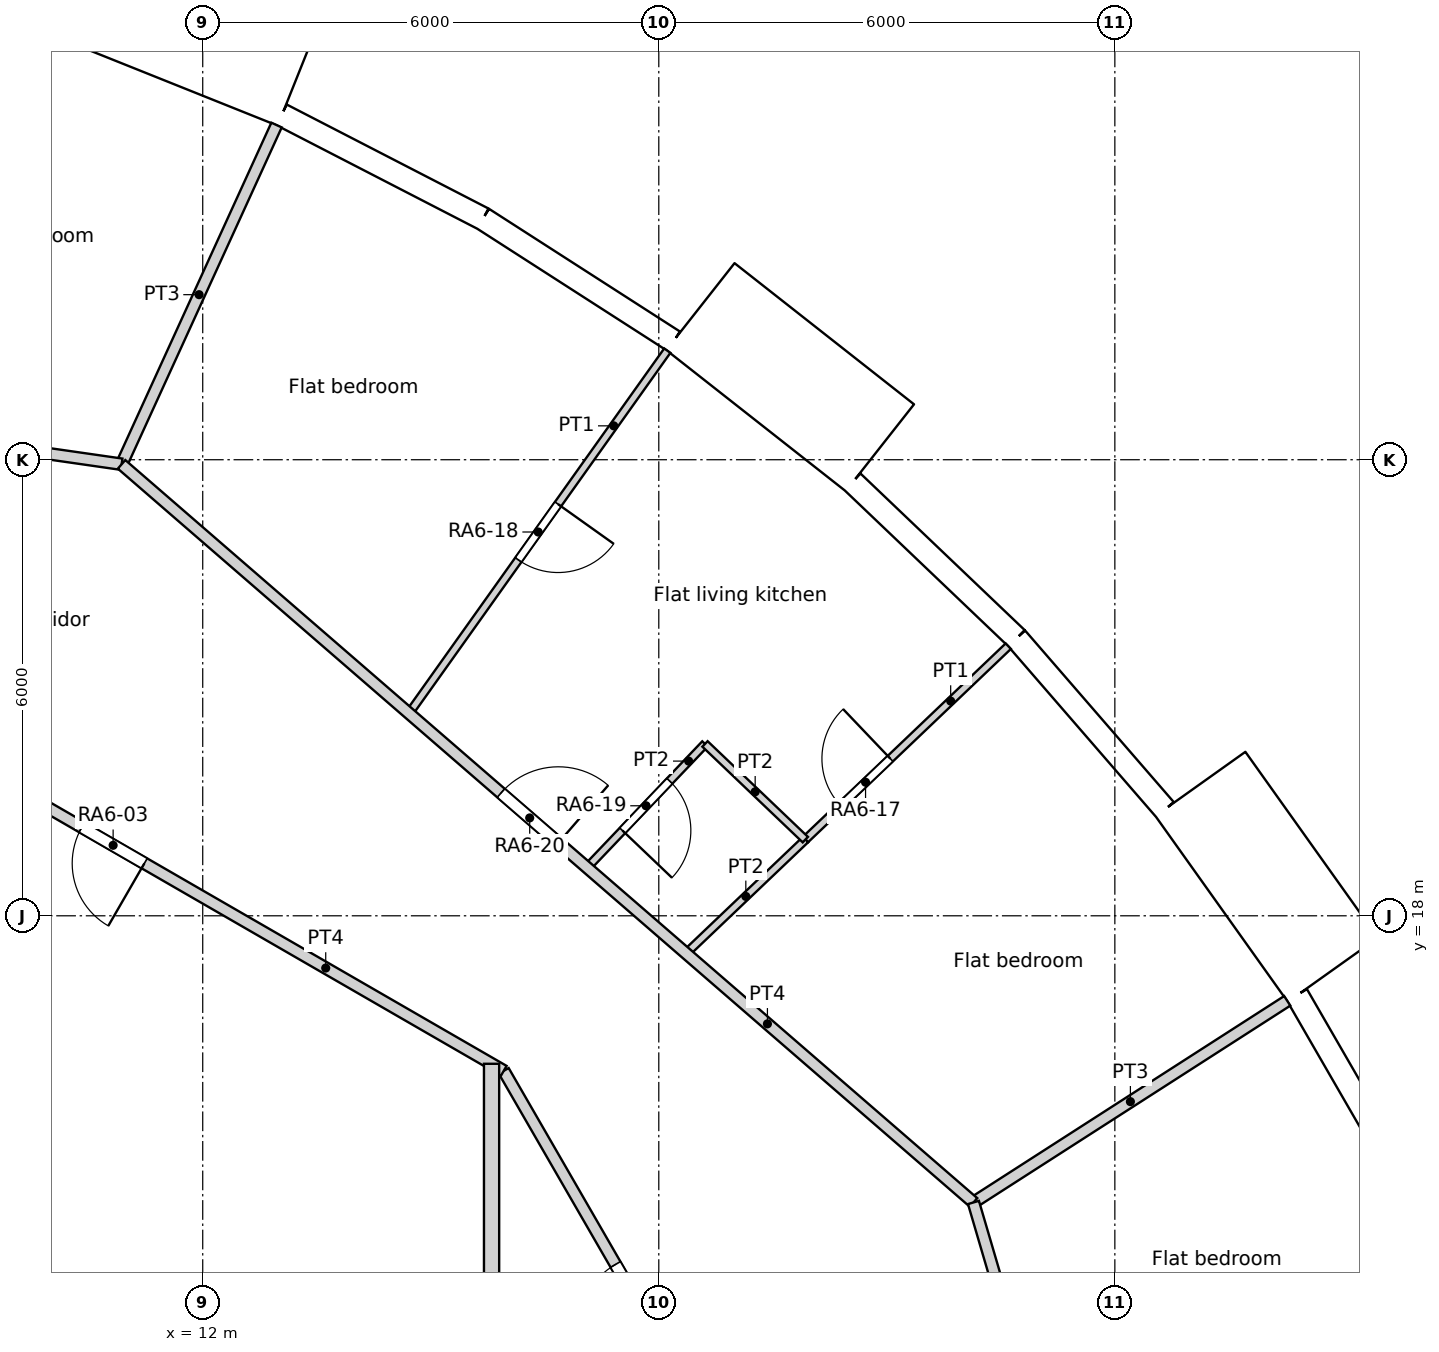
"""IFC4 building model, lengths in metres.
Left out: names, types, materials, properties, quantities, classifications, styles, units other than length and angle.
Written with IfcOpenShell. Run it as: python <this file> out.ifc"""

import sys

from ifc_helpers import new_model, si_unit, direction, frame, frame_2d, origin, origin_2d, place, context, subcontext, project, spatial, rectangle, circle, extrude, element, fill, save


model = new_model("IFC4")
c1 = context("Model", 3, precision=1e-05, world=origin(), true_north=direction((0.0, 1.0)))
c2 = subcontext(c1, "Body", "Model", "MODEL_VIEW")
j1 = project(units=[si_unit("LENGTHUNIT", "METRE"), si_unit("PLANEANGLEUNIT", "RADIAN")], contexts=[c1])
p1 = place(None, origin())
s1 = spatial("IfcSite", under=j1, at=p1, CompositionType="ELEMENT")
p2 = place(p1, origin())
s2 = spatial("IfcBuilding", under=s1, at=p2, CompositionType="ELEMENT")
p3 = place(p2, frame((0.0, 0.0, 82.2)))
s3 = spatial("IfcBuildingStorey", under=s2, at=p3, CompositionType="ELEMENT", Elevation=82.2)
for number, where, z_axis, x_axis in (
    (1, (25.469, 16.368, 0.0), (0.0, 0.0, 1.0), (1.0, 0.0, 0.0)),
    (2, (21.911, 20.892, 0.0), (0.0, 0.0, 1.0), (1.0, 0.0, 0.0)),
    (3, (17.561, 24.661, 0.0), (0.0, 0.0, 1.0), (1.0, 0.0, 0.0)),
    (4, (12.576, 27.539, 0.0), (0.0, 0.0, 1.0), (1.0, 0.0, 0.0)),
):
    element("IfcColumn", number, at=place(p3, frame(where, z_axis=z_axis, x_axis=x_axis)), inside=s3, PredefinedType="COLUMN", context=c2, shape_type="SweptSolid", body=[
        extrude(circle(Radius=0.6, at=origin_2d()), origin(), (0.0, 0.0, 1.0), 3.6),
    ])
for number, where, z_axis, x_axis in (
    (5, (18.805, 15.779, 0.0), (0.0, 0.0, 1.0), (1.0, 0.0, 0.0)),
    (6, (14.659, 19.69, 0.0), (0.0, 0.0, 1.0), (1.0, 0.0, 0.0)),
    (7, (9.723, 22.54, 0.0), (0.0, 0.0, 1.0), (1.0, 0.0, 0.0)),
):
    element("IfcColumn", number, at=place(p3, frame(where, z_axis=z_axis, x_axis=x_axis)), inside=s3, PredefinedType="COLUMN", context=c2, shape_type="SweptSolid", body=[
        extrude(circle(Radius=0.65, at=origin_2d()), origin(), (0.0, 0.0, 1.0), 3.6),
    ])
p4 = place(p3, frame((11.735, 14.716, 0.0), z_axis=(0.0, 0.0, 1.0), x_axis=(1.0, 0.0, 0.0)))
e8 = element("IfcColumn", 8, at=p4, inside=s3, PredefinedType="COLUMN", context=c2, shape_type="SweptSolid", body=[
    extrude(circle(Radius=0.7, at=origin_2d()), origin(), (0.0, 0.0, 1.0), 3.6),
])
p5 = place(p3, frame((27.887, 14.377, 0.0), z_axis=(0.0, 0.0, 1.0), x_axis=(-0.499999078476, 0.866025935826, 0.0)))
e9 = element("IfcWall", 9, at=p5, inside=s3, PredefinedType="SOLIDWALL", context=c2, shape_type="SweptSolid", body=[
    extrude(rectangle(XDim=2.979, YDim=0.3, at=frame_2d((1.49, 0.0))), origin(), (0.0, 0.0, 1.0), 3.15),
])
p6 = place(p5, frame((1.49, 0.0, 1.55)))
e10 = element("IfcOpeningElement", 10, at=p6, cuts=e9, PredefinedType="OPENING", context=c2, shape_type="SweptSolid", body=[
    extrude(circle(Radius=0.9, at=origin_2d()), frame((0.0, 0.16, 0.0), z_axis=(0.0, -1.0, 0.0), x_axis=(1.0, 0.0, 0.0)), (0.0, 0.0, 1.0), 0.32),
])
p7 = place(p3, frame((26.866, 17.29, -0.45), z_axis=(0.0, 0.0, 1.0), x_axis=(-0.580090570606, 0.814551981088, 0.0)))
e11 = element("IfcWall", 11, at=p7, inside=s3, PredefinedType="ELEMENTEDWALL", context=c2, shape_type="SweptSolid", body=[
    extrude(rectangle(XDim=3.0, YDim=1.45, at=frame_2d((1.5, 0.0))), origin(), (0.0, 0.0, 1.0), 3.6),
])
p8 = place(p7, frame((1.5, 0.0, 2.0)))
e12 = element("IfcOpeningElement", 12, at=p8, cuts=e11, PredefinedType="OPENING", context=c2, shape_type="SweptSolid", body=[
    extrude(circle(Radius=0.9, at=origin_2d()), frame((0.0, 0.735, 0.0), z_axis=(0.0, -1.0, 0.0), x_axis=(1.0, 0.0, 0.0)), (0.0, 0.0, 1.0), 1.47),
])
p9 = place(p3, frame((24.658, 19.399, 0.0), z_axis=(0.0, 0.0, 1.0), x_axis=(-0.654830712471, 0.755775587066, 0.0)))
e13 = element("IfcWall", 13, at=p9, inside=s3, PredefinedType="SOLIDWALL", context=c2, shape_type="SweptSolid", body=[
    extrude(rectangle(XDim=2.98, YDim=0.3, at=frame_2d((1.49, 0.0))), origin(), (0.0, 0.0, 1.0), 3.15),
])
p10 = place(p9, frame((1.49, 0.0, 1.55)))
e14 = element("IfcOpeningElement", 14, at=p10, cuts=e13, PredefinedType="OPENING", context=c2, shape_type="SweptSolid", body=[
    extrude(circle(Radius=0.9, at=origin_2d()), frame((0.0, 0.16, 0.0), z_axis=(0.0, -1.0, 0.0), x_axis=(1.0, 0.0, 0.0)), (0.0, 0.0, 1.0), 0.32),
])
p11 = place(p3, frame((22.707, 21.651, 0.0), z_axis=(0.0, 0.0, 1.0), x_axis=(-0.723744206617, 0.690068346896, 0.0)))
e15 = element("IfcWall", 15, at=p11, inside=s3, PredefinedType="SOLIDWALL", context=c2, shape_type="SweptSolid", body=[
    extrude(rectangle(XDim=2.98, YDim=0.3, at=frame_2d((1.49, 0.0))), origin(), (0.0, 0.0, 1.0), 3.15),
])
p12 = place(p11, frame((1.49, 0.0, 1.55)))
e16 = element("IfcOpeningElement", 16, at=p12, cuts=e15, PredefinedType="OPENING", context=c2, shape_type="SweptSolid", body=[
    extrude(circle(Radius=0.9, at=origin_2d()), frame((0.0, 0.16, 0.0), z_axis=(0.0, -1.0, 0.0), x_axis=(1.0, 0.0, 0.0)), (0.0, 0.0, 1.0), 0.32),
])
p13 = place(p3, frame((20.907, 24.159, -0.45), z_axis=(0.0, 0.0, 1.0), x_axis=(-0.786049992888, 0.618162930529, 0.0)))
e17 = element("IfcWall", 17, at=p13, inside=s3, PredefinedType="ELEMENTEDWALL", context=c2, shape_type="SweptSolid", body=[
    extrude(rectangle(XDim=3.0, YDim=1.45, at=frame_2d((1.5, 0.0))), origin(), (0.0, 0.0, 1.0), 3.6),
])
p14 = place(p13, frame((1.5, 0.0, 2.0)))
e18 = element("IfcOpeningElement", 18, at=p14, cuts=e17, PredefinedType="OPENING", context=c2, shape_type="SweptSolid", body=[
    extrude(circle(Radius=0.9, at=origin_2d()), frame((0.0, 0.735, 0.0), z_axis=(0.0, -1.0, 0.0), x_axis=(1.0, 0.0, 0.0)), (0.0, 0.0, 1.0), 1.47),
])
p15 = place(p3, frame((18.194, 25.56, 0.0), z_axis=(0.0, 0.0, 1.0), x_axis=(-0.84122372879, 0.540687190639, 0.0)))
e19 = element("IfcWall", 19, at=p15, inside=s3, PredefinedType="SOLIDWALL", context=c2, shape_type="SweptSolid", body=[
    extrude(rectangle(XDim=2.98, YDim=0.3, at=frame_2d((1.49, 0.0))), origin(), (0.0, 0.0, 1.0), 3.15),
])
p16 = place(p15, frame((1.49, 0.0, 1.55)))
e20 = element("IfcOpeningElement", 20, at=p16, cuts=e19, PredefinedType="OPENING", context=c2, shape_type="SweptSolid", body=[
    extrude(circle(Radius=0.9, at=origin_2d()), frame((0.0, 0.16, 0.0), z_axis=(0.0, -1.0, 0.0), x_axis=(1.0, 0.0, 0.0)), (0.0, 0.0, 1.0), 0.32),
])
p17 = place(p3, frame((15.687, 27.171, 0.0), z_axis=(0.0, 0.0, 1.0), x_axis=(-0.888853225096, 0.4581920386, 0.0)))
e21 = element("IfcWall", 21, at=p17, inside=s3, PredefinedType="SOLIDWALL", context=c2, shape_type="SweptSolid", body=[
    extrude(rectangle(XDim=2.979, YDim=0.3, at=frame_2d((1.49, 0.0))), origin(), (0.0, 0.0, 1.0), 3.15),
])
p18 = place(p17, frame((1.49, 0.0, 1.55)))
e22 = element("IfcOpeningElement", 22, at=p18, cuts=e21, PredefinedType="OPENING", context=c2, shape_type="SweptSolid", body=[
    extrude(circle(Radius=0.9, at=origin_2d()), frame((0.0, 0.16, 0.0), z_axis=(0.0, -1.0, 0.0), x_axis=(1.0, 0.0, 0.0)), (0.0, 0.0, 1.0), 0.32),
])
p19 = place(p3, frame((13.254, 29.07, -0.45), z_axis=(0.0, 0.0, 1.0), x_axis=(-0.928358776184, 0.371685327504, 0.0)))
e23 = element("IfcWall", 23, at=p19, inside=s3, PredefinedType="ELEMENTEDWALL", context=c2, shape_type="SweptSolid", body=[
    extrude(rectangle(XDim=3.0, YDim=1.45, at=frame_2d((1.5, 0.0))), origin(), (0.0, 0.0, 1.0), 3.6),
])
p20 = place(p19, frame((1.5, 0.0, 2.0)))
e24 = element("IfcOpeningElement", 24, at=p20, cuts=e23, PredefinedType="OPENING", context=c2, shape_type="SweptSolid", body=[
    extrude(circle(Radius=0.9, at=origin_2d()), frame((0.0, 0.735, 0.0), z_axis=(0.0, -1.0, 0.0), x_axis=(1.0, 0.0, 0.0)), (0.0, 0.0, 1.0), 1.47),
])
p21 = place(p3, frame((15.96, 15.96, 0.0), z_axis=(0.0, 0.0, 1.0), x_axis=(0.499992689227, -0.86602962462, 0.0)))
e25 = element("IfcWall", 25, at=p21, inside=s3, PredefinedType="PARTITIONING", context=c2, shape_type="SweptSolid", body=[
    extrude(rectangle(XDim=6.882, YDim=0.15, at=frame_2d((3.441, 0.0))), origin(), (0.0, 0.0, 1.0), 3.15),
])
p22 = place(p21, frame((2.941, 0.0, 0.0)))
e26 = element("IfcOpeningElement", 26, at=p22, cuts=e25, PredefinedType="OPENING", context=c2, shape_type="SweptSolid", body=[
    extrude(rectangle(XDim=1.0, YDim=2.04, at=frame_2d((0.5, 1.02))), frame((0.0, 0.075, 0.0), z_axis=(0.0, -1.0, 0.0), x_axis=(1.0, 0.0, 0.0)), (0.0, 0.0, 1.0), 0.15),
])
p23 = place(p3, frame((22.14, 14.229, 0.0), z_axis=(0.0, 0.0, 1.0), x_axis=(0.281845438276, -0.959459821422, 0.0)))
e27 = element("IfcWall", 27, at=p23, inside=s3, PredefinedType="PARTITIONING", context=c2, shape_type="SweptSolid", body=[
    extrude(rectangle(XDim=14.83, YDim=0.15, at=frame_2d((7.415, 0.0))), origin(), (0.0, 0.0, 1.0), 3.15),
])
p24 = place(p23, frame((6.053, 0.0, 0.0)))
e28 = element("IfcOpeningElement", 28, at=p24, cuts=e27, PredefinedType="OPENING", context=c2, shape_type="SweptSolid", body=[
    extrude(rectangle(XDim=1.0, YDim=2.1, at=frame_2d((0.5, 1.05))), frame((0.0, 0.075, 0.0), z_axis=(0.0, -1.0, 0.0), x_axis=(1.0, 0.0, 0.0)), (0.0, 0.0, 1.0), 0.15),
])
p25 = place(p3, frame((10.932, 23.939, 0.0), z_axis=(0.0, 0.0, 1.0), x_axis=(0.755823777664, -0.654775088956, 0.0)))
e29 = element("IfcWall", 29, at=p25, inside=s3, PredefinedType="PARTITIONING", context=c2, shape_type="SweptSolid", body=[
    extrude(rectangle(XDim=14.83, YDim=0.15, at=frame_2d((7.415, 0.0))), origin(), (0.0, 0.0, 1.0), 3.15),
])
p26 = place(p25, frame((6.604, 0.0, 0.0)))
e30 = element("IfcOpeningElement", 30, at=p26, cuts=e29, PredefinedType="OPENING", context=c2, shape_type="SweptSolid", body=[
    extrude(rectangle(XDim=1.0, YDim=2.1, at=frame_2d((0.5, 1.05))), frame((0.0, 0.075, 0.0), z_axis=(0.0, -1.0, 0.0), x_axis=(1.0, 0.0, 0.0)), (0.0, 0.0, 1.0), 0.15),
])
p27 = place(p3, frame((5.842, 21.802, 0.0), z_axis=(0.0, 0.0, 1.0), x_axis=(0.866031778836, -0.499988957924, 0.0)))
e31 = element("IfcWall", 31, at=p27, inside=s3, PredefinedType="PARTITIONING", context=c2, shape_type="SweptSolid", body=[
    extrude(rectangle(XDim=11.683, YDim=0.15, at=frame_2d((5.842, 0.0))), origin(), (0.0, 0.0, 1.0), 3.15),
])
p28 = place(p27, frame((5.274, 0.0, 0.0)))
e32 = element("IfcOpeningElement", 32, at=p28, cuts=e31, PredefinedType="OPENING", context=c2, shape_type="SweptSolid", body=[
    extrude(rectangle(XDim=0.95, YDim=2.1, at=frame_2d((0.475, 1.05))), frame((0.0, 0.075, 0.0), z_axis=(0.0, -1.0, 0.0), x_axis=(1.0, 0.0, 0.0)), (0.0, 0.0, 1.0), 0.15),
])
p29 = place(p3, frame((-3.746, 26.05, 0.0), z_axis=(0.0, 0.0, 1.0), x_axis=(0.989832601965, -0.14223719657, 0.0)))
e33 = element("IfcWall", 33, at=p29, inside=s3, PredefinedType="PARTITIONING", context=c2, shape_type="SweptSolid", body=[
    extrude(rectangle(XDim=14.83, YDim=0.15, at=frame_2d((7.415, 0.0))), origin(), (0.0, 0.0, 1.0), 3.15),
])
p30 = place(p29, frame((6.054, 0.0, 0.0)))
e34 = element("IfcOpeningElement", 34, at=p30, cuts=e33, PredefinedType="OPENING", context=c2, shape_type="SweptSolid", body=[
    extrude(rectangle(XDim=1.0, YDim=2.1, at=frame_2d((0.5, 1.05))), frame((0.0, 0.075, 0.0), z_axis=(0.0, -1.0, 0.0), x_axis=(1.0, 0.0, 0.0)), (0.0, 0.0, 1.0), 0.15),
])
p31 = place(p3, frame((15.8, 10.0, 0.0), z_axis=(0.0, 0.0, 1.0), x_axis=(0.0, 1.0, 0.0)))
e35 = element("IfcWall", 35, at=p31, inside=s3, PredefinedType="PARTITIONING", context=c2, shape_type="SweptSolid", body=[
    extrude(rectangle(XDim=6.053, YDim=0.2, at=frame_2d((3.026, 0.0))), origin(), (0.0, 0.0, 1.0), 3.15),
])
p32 = place(p3, frame((22.141, 14.229, 0.0), z_axis=(0.0, 0.0, 1.0), x_axis=(0.841265781699, 0.540621757371, 0.0)))
e36 = element("IfcWall", 36, at=p32, inside=s3, PredefinedType="PARTITIONING", context=c2, shape_type="SweptSolid", body=[
    extrude(rectangle(XDim=4.906, YDim=0.15, at=frame_2d((2.453, 0.0))), origin(), (0.0, 0.0, 1.0), 3.15),
])
p33 = place(p3, frame((19.928, 19.002, 0.0), z_axis=(0.0, 0.0, 1.0), x_axis=(0.723815182922, 0.689993899228, 0.0)))
e37 = element("IfcWall", 37, at=p33, inside=s3, PredefinedType="PARTITIONING", context=c2, shape_type="SweptSolid", body=[
    extrude(rectangle(XDim=3.689, YDim=0.1, at=frame_2d((1.844, 0.0))), origin(), (0.0, 0.0, 1.0), 3.15),
])
p34 = place(p33, frame((0.645, 0.0, 0.0)))
e38 = element("IfcOpeningElement", 38, at=p34, cuts=e37, PredefinedType="OPENING", context=c2, shape_type="SweptSolid", body=[
    extrude(rectangle(XDim=0.9, YDim=2.1, at=frame_2d((0.45, 1.05))), frame((0.0, 0.05, 0.0), z_axis=(0.0, -1.0, 0.0), x_axis=(1.0, 0.0, 0.0)), (0.0, 0.0, 1.0), 0.1),
])
p35 = place(p3, frame((14.715, 20.664, 0.0), z_axis=(0.0, 0.0, 1.0), x_axis=(0.580007254017, 0.814611309329, 0.0)))
e39 = element("IfcWall", 39, at=p35, inside=s3, PredefinedType="PARTITIONING", context=c2, shape_type="SweptSolid", body=[
    extrude(rectangle(XDim=5.857, YDim=0.1, at=frame_2d((2.928, 0.0))), origin(), (0.0, 0.0, 1.0), 3.15),
])
p36 = place(p35, frame((2.478, 0.0, 0.0)))
e40 = element("IfcOpeningElement", 40, at=p36, cuts=e39, PredefinedType="OPENING", context=c2, shape_type="SweptSolid", body=[
    extrude(rectangle(XDim=0.9, YDim=2.1, at=frame_2d((0.45, 1.05))), frame((0.0, 0.05, 0.0), z_axis=(0.0, -1.0, 0.0), x_axis=(1.0, 0.0, 0.0)), (0.0, 0.0, 1.0), 0.1),
])
p37 = place(p3, frame((18.608, 20.261, 0.0), z_axis=(0.0, 0.0, 1.0), x_axis=(0.723638053237, -0.690179663499, 0.0)))
e41 = element("IfcWall", 41, at=p37, inside=s3, PredefinedType="PARTITIONING", context=c2, shape_type="SweptSolid", body=[
    extrude(rectangle(XDim=1.824, YDim=0.1, at=frame_2d((0.912, 0.0))), origin(), (0.0, 0.0, 1.0), 3.15),
])
p38 = place(p3, frame((17.057, 18.634, 0.0), z_axis=(0.0, 0.0, 1.0), x_axis=(0.690015794307, 0.723794310289, 0.0)))
e42 = element("IfcWall", 42, at=p38, inside=s3, PredefinedType="PARTITIONING", context=c2, shape_type="SweptSolid", body=[
    extrude(rectangle(XDim=2.248, YDim=0.1, at=frame_2d((1.124, 0.0))), origin(), (0.0, 0.0, 1.0), 3.15),
])
p39 = place(p38, frame((0.674, 0.0, 0.0)))
e43 = element("IfcOpeningElement", 43, at=p39, cuts=e42, PredefinedType="OPENING", context=c2, shape_type="SweptSolid", body=[
    extrude(rectangle(XDim=0.9, YDim=2.0, at=frame_2d((0.45, 1.0))), frame((0.0, 0.05, 0.0), z_axis=(0.0, -1.0, 0.0), x_axis=(1.0, 0.0, 0.0)), (0.0, 0.0, 1.0), 0.1),
])
p40 = place(p3, frame((18.359, 17.506, 0.0), z_axis=(0.0, 0.0, 1.0), x_axis=(0.723990848888, 0.689809575699, 0.0)))
e44 = element("IfcWall", 44, at=p40, inside=s3, PredefinedType="PARTITIONING", context=c2, shape_type="SweptSolid", body=[
    extrude(rectangle(XDim=2.171, YDim=0.1, at=frame_2d((1.086, 0.0))), origin(), (0.0, 0.0, 1.0), 3.15),
])
p41 = place(p3, frame((10.933, 23.94, 0.0), z_axis=(0.0, 0.0, 1.0), x_axis=(0.415346954488, 0.909663073559, 0.0)))
e45 = element("IfcWall", 45, at=p41, inside=s3, PredefinedType="PARTITIONING", context=c2, shape_type="SweptSolid", body=[
    extrude(rectangle(XDim=4.906, YDim=0.15, at=frame_2d((2.453, 0.0))), origin(), (0.0, 0.0, 1.0), 3.15),
])
p42 = place(p6, origin())
e46 = element("IfcWindow", 46, at=p42, inside=s3, PartitioningType="SINGLE_PANEL", PredefinedType="WINDOW", context=c2, shape_type="SweptSolid", body=[
    extrude(circle(Radius=0.9, at=origin_2d()), frame((0.0, 0.12, 0.0), z_axis=(0.0, -1.0, 0.0), x_axis=(1.0, 0.0, 0.0)), (0.0, 0.0, 1.0), 0.1),
])
fill(e10, e46)
p43 = place(p8, origin())
e47 = element("IfcWindow", 47, at=p43, inside=s3, PartitioningType="SINGLE_PANEL", PredefinedType="WINDOW", context=c2, shape_type="SweptSolid", body=[
    extrude(circle(Radius=0.9, at=origin_2d()), frame((0.0, 0.695, 0.0), z_axis=(0.0, -1.0, 0.0), x_axis=(1.0, 0.0, 0.0)), (0.0, 0.0, 1.0), 0.1),
])
fill(e12, e47)
p44 = place(p10, origin())
e48 = element("IfcWindow", 48, at=p44, inside=s3, PartitioningType="SINGLE_PANEL", PredefinedType="WINDOW", context=c2, shape_type="SweptSolid", body=[
    extrude(circle(Radius=0.9, at=origin_2d()), frame((0.0, 0.12, 0.0), z_axis=(0.0, -1.0, 0.0), x_axis=(1.0, 0.0, 0.0)), (0.0, 0.0, 1.0), 0.1),
])
fill(e14, e48)
p45 = place(p12, origin())
e49 = element("IfcWindow", 49, at=p45, inside=s3, PartitioningType="SINGLE_PANEL", PredefinedType="WINDOW", context=c2, shape_type="SweptSolid", body=[
    extrude(circle(Radius=0.9, at=origin_2d()), frame((0.0, 0.12, 0.0), z_axis=(0.0, -1.0, 0.0), x_axis=(1.0, 0.0, 0.0)), (0.0, 0.0, 1.0), 0.1),
])
fill(e16, e49)
p46 = place(p14, origin())
e50 = element("IfcWindow", 50, at=p46, inside=s3, PartitioningType="SINGLE_PANEL", PredefinedType="WINDOW", context=c2, shape_type="SweptSolid", body=[
    extrude(circle(Radius=0.9, at=origin_2d()), frame((0.0, 0.695, 0.0), z_axis=(0.0, -1.0, 0.0), x_axis=(1.0, 0.0, 0.0)), (0.0, 0.0, 1.0), 0.1),
])
fill(e18, e50)
p47 = place(p16, origin())
e51 = element("IfcWindow", 51, at=p47, inside=s3, PartitioningType="SINGLE_PANEL", PredefinedType="WINDOW", context=c2, shape_type="SweptSolid", body=[
    extrude(circle(Radius=0.9, at=origin_2d()), frame((0.0, 0.12, 0.0), z_axis=(0.0, -1.0, 0.0), x_axis=(1.0, 0.0, 0.0)), (0.0, 0.0, 1.0), 0.1),
])
fill(e20, e51)
p48 = place(p18, origin())
e52 = element("IfcWindow", 52, at=p48, inside=s3, PartitioningType="SINGLE_PANEL", PredefinedType="WINDOW", context=c2, shape_type="SweptSolid", body=[
    extrude(circle(Radius=0.9, at=origin_2d()), frame((0.0, 0.12, 0.0), z_axis=(0.0, -1.0, 0.0), x_axis=(1.0, 0.0, 0.0)), (0.0, 0.0, 1.0), 0.1),
])
fill(e22, e52)
p49 = place(p20, origin())
e53 = element("IfcWindow", 53, at=p49, inside=s3, PartitioningType="SINGLE_PANEL", PredefinedType="WINDOW", context=c2, shape_type="SweptSolid", body=[
    extrude(circle(Radius=0.9, at=origin_2d()), frame((0.0, 0.695, 0.0), z_axis=(0.0, -1.0, 0.0), x_axis=(1.0, 0.0, 0.0)), (0.0, 0.0, 1.0), 0.1),
])
fill(e24, e53)
p50 = place(p28, origin())
e54 = element("IfcDoor", 54, at=p50, inside=s3, OperationType="SINGLE_SWING_LEFT", PredefinedType="DOOR", context=c2, shape_type="SweptSolid", body=[
    extrude(rectangle(XDim=0.95, YDim=2.1, at=frame_2d((0.475, 1.05))), frame((0.0, 0.025, 0.0), z_axis=(0.0, -1.0, 0.0), x_axis=(1.0, 0.0, 0.0)), (0.0, 0.0, 1.0), 0.05),
])
fill(e32, e54)
p51 = place(p22, origin())
e55 = element("IfcDoor", 55, at=p51, inside=s3, OperationType="SINGLE_SWING_LEFT", PredefinedType="DOOR", context=c2, shape_type="SweptSolid", body=[
    extrude(rectangle(XDim=1.0, YDim=2.04, at=frame_2d((0.5, 1.02))), frame((0.0, 0.025, 0.0), z_axis=(0.0, -1.0, 0.0), x_axis=(1.0, 0.0, 0.0)), (0.0, 0.0, 1.0), 0.05),
])
fill(e26, e55)
p52 = place(p34, origin())
e56 = element("IfcDoor", 56, at=p52, inside=s3, OperationType="SINGLE_SWING_RIGHT", PredefinedType="DOOR", context=c2, shape_type="SweptSolid", body=[
    extrude(rectangle(XDim=0.9, YDim=2.1, at=frame_2d((0.45, 1.05))), frame((0.0, 0.025, 0.0), z_axis=(0.0, -1.0, 0.0), x_axis=(1.0, 0.0, 0.0)), (0.0, 0.0, 1.0), 0.05),
])
fill(e38, e56)
p53 = place(p36, origin())
e57 = element("IfcDoor", 57, at=p53, inside=s3, OperationType="SINGLE_SWING_LEFT", PredefinedType="DOOR", context=c2, shape_type="SweptSolid", body=[
    extrude(rectangle(XDim=0.9, YDim=2.1, at=frame_2d((0.45, 1.05))), frame((0.0, 0.025, 0.0), z_axis=(0.0, -1.0, 0.0), x_axis=(1.0, 0.0, 0.0)), (0.0, 0.0, 1.0), 0.05),
])
fill(e40, e57)
p54 = place(p39, origin())
e58 = element("IfcDoor", 58, at=p54, inside=s3, OperationType="SINGLE_SWING_RIGHT", PredefinedType="DOOR", context=c2, shape_type="SweptSolid", body=[
    extrude(rectangle(XDim=0.9, YDim=2.0, at=frame_2d((0.45, 1.0))), frame((0.0, 0.025, 0.0), z_axis=(0.0, -1.0, 0.0), x_axis=(1.0, 0.0, 0.0)), (0.0, 0.0, 1.0), 0.05),
])
fill(e43, e58)
p55 = place(p26, origin())
e59 = element("IfcDoor", 59, at=p55, inside=s3, OperationType="SINGLE_SWING_RIGHT", PredefinedType="DOOR", context=c2, shape_type="SweptSolid", body=[
    extrude(rectangle(XDim=1.0, YDim=2.1, at=frame_2d((0.5, 1.05))), frame((0.0, 0.025, 0.0), z_axis=(0.0, -1.0, 0.0), x_axis=(1.0, 0.0, 0.0)), (0.0, 0.0, 1.0), 0.05),
])
fill(e30, e59)
save(model, sys.argv[1])
